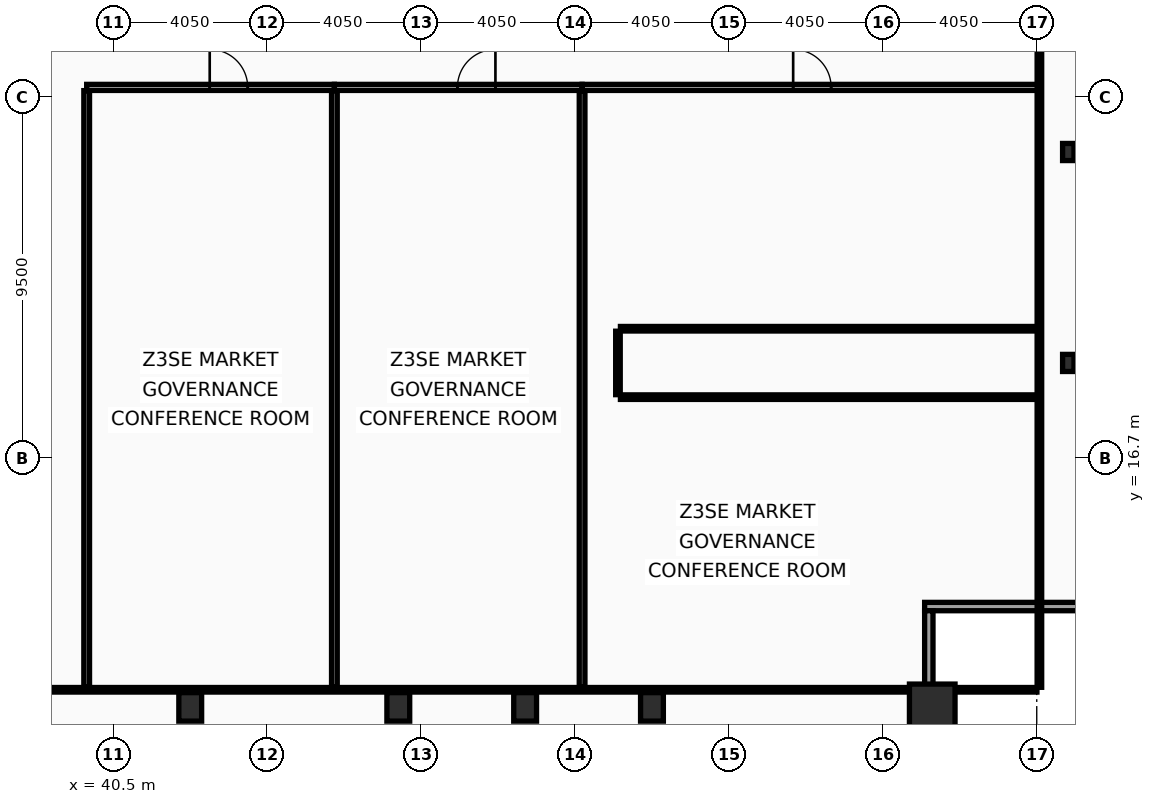
"""IFC4 building model, lengths in metres.
Left out: names, types, materials, properties, quantities, classifications, styles, units other than length and angle.
Written with IfcOpenShell. Run it as: python <this file> out.ifc"""

import sys

from ifc_helpers import new_model, si_unit, direction, frame, frame_2d, origin, origin_2d, place, context, subcontext, project, spatial, rectangle, hollow_rectangle, i_section, extrude, element, fill, save


model = new_model("IFC4")
c1 = context("Model", 3, precision=1e-05, world=origin(), true_north=direction((0.0, 1.0)))
c2 = subcontext(c1, "Body", "Model", "MODEL_VIEW")
j1 = project(units=[si_unit("LENGTHUNIT", "METRE"), si_unit("PLANEANGLEUNIT", "RADIAN")], contexts=[c1])
p1 = place(None, origin())
s1 = spatial("IfcSite", under=j1, at=p1, CompositionType="ELEMENT")
p2 = place(p1, origin())
s2 = spatial("IfcBuilding", under=s1, at=p2, CompositionType="ELEMENT")
p3 = place(p2, frame((0.0, 0.0, 235.4)))
s3 = spatial("IfcBuildingStorey", under=s2, at=p3, CompositionType="ELEMENT", Elevation=235.4)
p4 = place(p3, frame((62.05, 10.15, 0.0), z_axis=(0.0, 0.0, 1.0), x_axis=(1.0, 0.0, 0.0)))
e1 = element("IfcColumn", 1, at=p4, inside=s3, PredefinedType="COLUMN", context=c2, shape_type="SweptSolid", body=[
    extrude(hollow_rectangle(XDim=1.2, YDim=1.2, WallThickness=0.06, at=origin_2d()), origin(), (0.0, 0.0, 1.0), 3.6),
])
for number, where, z_axis, x_axis in (
    (2, (42.525, 10.15, 0.0), (0.0, 0.0, 1.0), (1.0, 0.0, 0.0)),
    (3, (48.0, 10.15, 0.0), (0.0, 0.0, 1.0), (1.0, 0.0, 0.0)),
    (4, (51.337, 10.15, 0.0), (0.0, 0.0, 1.0), (1.0, 0.0, 0.0)),
    (5, (54.675, 10.15, 0.0), (0.0, 0.0, 1.0), (1.0, 0.0, 0.0)),
):
    element("IfcColumn", number, at=place(p3, frame(where, z_axis=z_axis, x_axis=x_axis)), inside=s3, PredefinedType="COLUMN", context=c2, shape_type="SweptSolid", body=[
        extrude(hollow_rectangle(XDim=0.6, YDim=0.75, WallThickness=0.045, at=origin_2d()), origin(), (0.0, 0.0, 1.0), 3.6),
    ])
for number, where, z_axis, x_axis in (
    (6, (65.63, 19.2, 0.0), (0.0, 0.0, 1.0), (1.0, 0.0, 0.0)),
    (7, (65.63, 24.75, 0.0), (0.0, 0.0, 1.0), (1.0, 0.0, 0.0)),
):
    element("IfcColumn", number, at=place(p3, frame(where, z_axis=z_axis, x_axis=x_axis)), inside=s3, PredefinedType="COLUMN", context=c2, shape_type="SweptSolid", body=[
        extrude(i_section(OverallWidth=0.3, OverallDepth=0.45, WebThickness=0.014, FlangeThickness=0.026, at=origin_2d()), origin(), (0.0, 0.0, 1.0), 3.6),
    ])
p5 = place(p3, frame((65.98, 12.79, 0.0), z_axis=(0.0, 0.0, 1.0), x_axis=(-1.0, 0.0, 0.0)))
e8 = element("IfcWall", 8, at=p5, inside=s3, PredefinedType="SOLIDWALL", context=c2, shape_type="SweptSolid", body=[
    extrude(rectangle(XDim=4.13, YDim=0.22, at=frame_2d((2.065, 0.0))), origin(), (0.0, 0.0, 1.0), 2.83),
])
p6 = place(p3, frame((61.96, 12.68, 0.0), z_axis=(0.0, 0.0, 1.0), x_axis=(0.0, -1.0, 0.0)))
e9 = element("IfcWall", 9, at=p6, inside=s3, PredefinedType="SOLIDWALL", context=c2, shape_type="SweptSolid", body=[
    extrude(rectangle(XDim=3.91, YDim=0.22, at=frame_2d((1.955, 0.0))), origin(), (0.0, 0.0, 1.0), 2.09),
])
p7 = place(p3, frame((39.8, 10.665, 0.0), z_axis=(0.0, 0.0, 1.0), x_axis=(0.0, 1.0, 0.0)))
e10 = element("IfcWall", 10, at=p7, inside=s3, PredefinedType="PARTITIONING", context=c2, shape_type="SweptSolid", body=[
    extrude(rectangle(XDim=15.7, YDim=0.15, at=frame_2d((7.85, 0.0))), origin(), (0.0, 0.0, 1.0), 2.98),
])
p8 = place(p3, frame((39.8, 26.45, 0.0), z_axis=(0.0, 0.0, 1.0), x_axis=(1.0, 0.0, 0.0)))
e11 = element("IfcWall", 11, at=p8, inside=s3, PredefinedType="PARTITIONING", context=c2, shape_type="SweptSolid", body=[
    extrude(rectangle(XDim=6.518, YDim=0.16, at=frame_2d((3.259, 0.0))), origin(), (0.0, 0.0, 1.0), 2.78),
])
p9 = place(p8, frame((3.238, 0.0, 0.0)))
e12 = element("IfcOpeningElement", 12, at=p9, cuts=e11, PredefinedType="OPENING", context=c2, shape_type="SweptSolid", body=[
    extrude(rectangle(XDim=1.0, YDim=2.05, at=frame_2d((0.5, 1.025))), frame((0.0, 0.09, 0.0), z_axis=(0.0, -1.0, 0.0), x_axis=(1.0, 0.0, 0.0)), (0.0, 0.0, 1.0), 0.18),
])
p10 = place(p3, frame((46.318, 26.45, 0.0), z_axis=(0.0, 0.0, 1.0), x_axis=(1.0, 0.0, 0.0)))
e13 = element("IfcWall", 13, at=p10, inside=s3, PredefinedType="PARTITIONING", context=c2, shape_type="SweptSolid", body=[
    extrude(rectangle(XDim=6.518, YDim=0.16, at=frame_2d((3.259, 0.0))), origin(), (0.0, 0.0, 1.0), 2.78),
])
p11 = place(p10, frame((3.238, 0.0, 0.0)))
e14 = element("IfcOpeningElement", 14, at=p11, cuts=e13, PredefinedType="OPENING", context=c2, shape_type="SweptSolid", body=[
    extrude(rectangle(XDim=1.0, YDim=2.05, at=frame_2d((0.5, 1.025))), frame((0.0, 0.09, 0.0), z_axis=(0.0, -1.0, 0.0), x_axis=(1.0, 0.0, 0.0)), (0.0, 0.0, 1.0), 0.18),
])
p12 = place(p3, frame((46.318, 10.665, 0.0), z_axis=(0.0, 0.0, 1.0), x_axis=(0.0, 1.0, 0.0)))
e15 = element("IfcWall", 15, at=p12, inside=s3, PredefinedType="PARTITIONING", context=c2, shape_type="SweptSolid", body=[
    extrude(rectangle(XDim=15.7, YDim=0.15, at=frame_2d((7.85, 0.0))), origin(), (0.0, 0.0, 1.0), 2.98),
])
p13 = place(p3, frame((52.836, 26.45, 0.0), z_axis=(0.0, 0.0, 1.0), x_axis=(1.0, 0.0, 0.0)))
e16 = element("IfcWall", 16, at=p13, inside=s3, PredefinedType="PARTITIONING", context=c2, shape_type="SweptSolid", body=[
    extrude(rectangle(XDim=12.034, YDim=0.16, at=frame_2d((6.017, 0.0))), origin(), (0.0, 0.0, 1.0), 2.53),
])
p14 = place(p13, frame((5.554, 0.0, 0.0)))
e17 = element("IfcOpeningElement", 17, at=p14, cuts=e16, PredefinedType="OPENING", context=c2, shape_type="SweptSolid", body=[
    extrude(rectangle(XDim=1.0, YDim=2.05, at=frame_2d((0.5, 1.025))), frame((0.0, 0.09, 0.0), z_axis=(0.0, -1.0, 0.0), x_axis=(1.0, 0.0, 0.0)), (0.0, 0.0, 1.0), 0.18),
])
p15 = place(p3, frame((52.836, 10.665, 0.0), z_axis=(0.0, 0.0, 1.0), x_axis=(0.0, 1.0, 0.0)))
e18 = element("IfcWall", 18, at=p15, inside=s3, PredefinedType="PARTITIONING", context=c2, shape_type="SweptSolid", body=[
    extrude(rectangle(XDim=15.7, YDim=0.15, at=frame_2d((7.85, 0.0))), origin(), (0.0, 0.0, 1.0), 2.98),
])
p16 = place(p3, frame((64.87, 10.665, 0.0), z_axis=(0.0, 0.0, 1.0), x_axis=(0.0, 1.0, 0.0)))
e19 = element("IfcWall", 19, at=p16, inside=s3, PredefinedType="PARTITIONING", context=c2, shape_type="SweptSolid", body=[
    extrude(rectangle(XDim=42.11, YDim=0.12, at=frame_2d((21.055, 0.0))), origin(), (0.0, 0.0, 1.0), 1.83),
])
p17 = place(p3, frame((8.095, 10.6, 0.0), z_axis=(0.0, 0.0, 1.0), x_axis=(1.0, 0.0, 0.0)))
e20 = element("IfcWall", 20, at=p17, inside=s3, PredefinedType="PARTITIONING", context=c2, shape_type="SweptSolid", body=[
    extrude(rectangle(XDim=56.71, YDim=0.12, at=frame_2d((28.355, 0.0))), origin(), (0.0, 0.0, 1.0), 2.09),
])
for number, where, z_axis, x_axis in (
    (21, (53.845, 18.3, 0.0), (0.0, 0.0, 1.0), (1.0, 0.0, 0.0)),
    (22, (53.845, 20.1, 0.0), (0.0, 0.0, 1.0), (1.0, 0.0, 0.0)),
):
    element("IfcWall", number, at=place(p3, frame(where, z_axis=z_axis, x_axis=x_axis)), inside=s3, PredefinedType="PARTITIONING", context=c2, shape_type="SweptSolid", body=[
        extrude(rectangle(XDim=10.96, YDim=0.12, at=frame_2d((5.48, 0.0))), origin(), (0.0, 0.0, 1.0), 2.53),
    ])
p18 = place(p3, frame((53.78, 18.365, 0.0), z_axis=(0.0, 0.0, 1.0), x_axis=(0.0, 1.0, 0.0)))
e23 = element("IfcWall", 23, at=p18, inside=s3, PredefinedType="PARTITIONING", context=c2, shape_type="SweptSolid", body=[
    extrude(rectangle(XDim=1.67, YDim=0.12, at=frame_2d((0.835, 0.0))), origin(), (0.0, 0.0, 1.0), 3.44),
])
p19 = place(p9, origin())
e24 = element("IfcDoor", 24, at=p19, inside=s3, OperationType="SINGLE_SWING_LEFT", PredefinedType="DOOR", context=c2, shape_type="SweptSolid", body=[
    extrude(rectangle(XDim=1.0, YDim=2.05, at=frame_2d((0.5, 1.025))), frame((0.0, 0.025, 0.0), z_axis=(0.0, -1.0, 0.0), x_axis=(1.0, 0.0, 0.0)), (0.0, 0.0, 1.0), 0.05),
])
fill(e12, e24)
p20 = place(p11, origin())
e25 = element("IfcDoor", 25, at=p20, inside=s3, OperationType="SINGLE_SWING_RIGHT", PredefinedType="DOOR", context=c2, shape_type="SweptSolid", body=[
    extrude(rectangle(XDim=1.0, YDim=2.05, at=frame_2d((0.5, 1.025))), frame((0.0, 0.025, 0.0), z_axis=(0.0, -1.0, 0.0), x_axis=(1.0, 0.0, 0.0)), (0.0, 0.0, 1.0), 0.05),
])
fill(e14, e25)
p21 = place(p14, origin())
e26 = element("IfcDoor", 26, at=p21, inside=s3, OperationType="SINGLE_SWING_LEFT", PredefinedType="DOOR", context=c2, shape_type="SweptSolid", body=[
    extrude(rectangle(XDim=1.0, YDim=2.05, at=frame_2d((0.5, 1.025))), frame((0.0, 0.025, 0.0), z_axis=(0.0, -1.0, 0.0), x_axis=(1.0, 0.0, 0.0)), (0.0, 0.0, 1.0), 0.05),
])
fill(e17, e26)
save(model, sys.argv[1])
